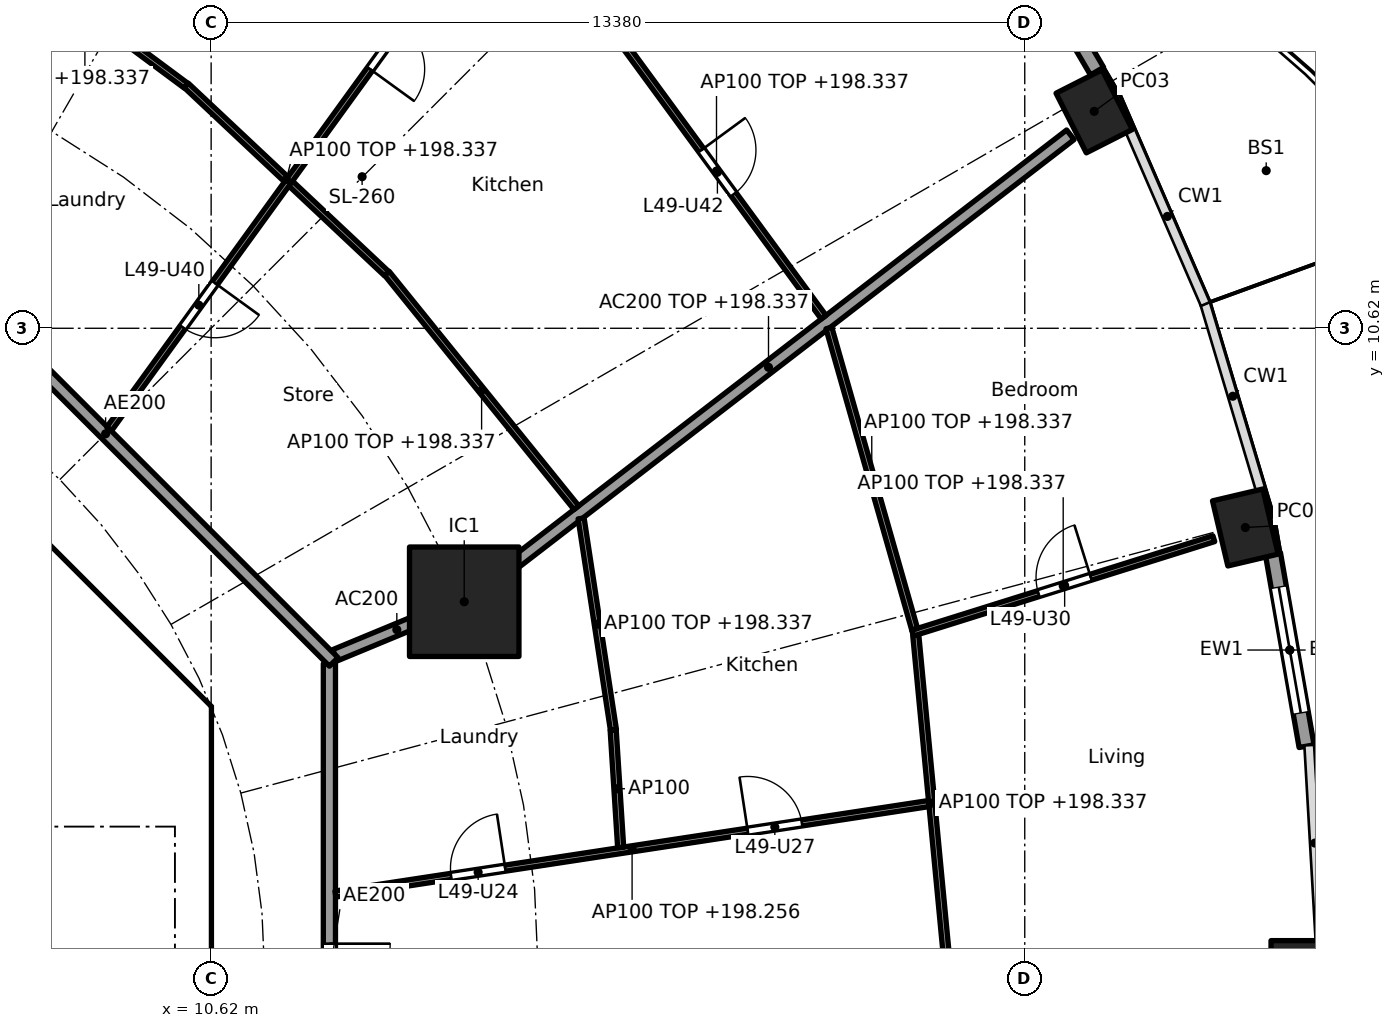
"""IFC4 building model, lengths in metres.
Left out: names, types, materials, properties, quantities, classifications, styles, units other than length and angle.
Written with IfcOpenShell. Run it as: python <this file> out.ifc"""

import sys

from ifc_helpers import new_model, si_unit, direction, frame, frame_2d, origin, origin_2d, place, context, subcontext, project, spatial, polyline, rectangle, hollow_rectangle, outline, extrude, element, fill, save


model = new_model("IFC4")
c1 = context("Model", 3, precision=1e-05, world=origin(), true_north=direction((0.0, 1.0)))
c2 = subcontext(c1, "Body", "Model", "MODEL_VIEW")
j1 = project(units=[si_unit("LENGTHUNIT", "METRE"), si_unit("PLANEANGLEUNIT", "RADIAN")], contexts=[c1])
p1 = place(None, origin())
s1 = spatial("IfcSite", under=j1, at=p1, CompositionType="ELEMENT")
p2 = place(p1, origin())
s2 = spatial("IfcBuilding", under=s1, at=p2, CompositionType="ELEMENT")
p3 = place(p2, frame((0.0, 0.0, 195.5)))
s3 = spatial("IfcBuildingStorey", under=s2, at=p3, CompositionType="ELEMENT", Elevation=195.5)
for number, where, z_axis, x_axis in (
    (1, (28.475, 0.0, 0.0), (0.0, 0.0, 1.0), (0.0, 1.0, 0.0)),
    (2, (27.627, 7.344, 0.0), (0.0, 0.0, 1.0), (-0.229, 0.973, 0.0)),
    (3, (25.142, 14.188, 0.0), (0.0, 0.0, 1.0), (-0.452, 0.892, 0.0)),
):
    element("IfcColumn", number, at=place(p3, frame(where, z_axis=z_axis, x_axis=x_axis)), inside=s3, PredefinedType="COLUMN", context=c2, shape_type="SweptSolid", body=[
        extrude(hollow_rectangle(XDim=1.1, YDim=0.85, WallThickness=0.036, at=origin_2d()), origin(), (0.0, 0.0, 1.0), 3.7),
    ])
p4 = place(p3, frame((14.782, 6.123, 0.0), z_axis=(0.0, 0.0, 1.0), x_axis=(1.0, 0.0, 0.0)))
e4 = element("IfcColumn", 4, at=p4, inside=s3, PredefinedType="COLUMN", context=c2, shape_type="SweptSolid", body=[
    extrude(rectangle(XDim=1.8, YDim=1.8, at=origin_2d()), origin(), (0.0, 0.0, 1.0), 3.7),
])
p5 = place(p3, frame((28.082, 6.91, 0.0), z_axis=(0.0, 0.0, 1.0), x_axis=(0.172149769468, -0.985070787747, 0.0)))
e5 = element("IfcWall", 5, at=p5, inside=s3, PredefinedType="SOLIDWALL", context=c2, shape_type="SweptSolid", body=[
    extrude(rectangle(XDim=3.211, YDim=0.25, at=frame_2d((1.605, 0.0))), origin(), (0.0, 0.0, 1.0), 3.44),
])
p6 = place(p5, frame((0.555, 0.0, 0.0)))
e6 = element("IfcOpeningElement", 6, at=p6, cuts=e5, PredefinedType="OPENING", context=c2, shape_type="SweptSolid", body=[
    extrude(rectangle(XDim=2.1, YDim=2.4, at=frame_2d((1.05, 1.2))), frame((0.0, 0.135, 0.0), z_axis=(0.0, -1.0, 0.0), x_axis=(1.0, 0.0, 0.0)), (0.0, 0.0, 1.0), 0.27),
])
p7 = place(p3, frame((23.624, 17.515, 0.0), z_axis=(0.0, 0.0, 1.0), x_axis=(0.506367803691, -0.862317602386, 0.0)))
e7 = element("IfcWall", 7, at=p7, inside=s3, PredefinedType="SOLIDWALL", context=c2, shape_type="SweptSolid", body=[
    extrude(rectangle(XDim=3.092, YDim=0.25, at=frame_2d((1.546, 0.0))), origin(), (0.0, 0.0, 1.0), 3.44),
])
p8 = place(p7, frame((0.496, 0.0, 0.0)))
e8 = element("IfcOpeningElement", 8, at=p8, cuts=e7, PredefinedType="OPENING", context=c2, shape_type="SweptSolid", body=[
    extrude(rectangle(XDim=2.1, YDim=2.4, at=frame_2d((1.05, 1.2))), frame((0.0, 0.135, 0.0), z_axis=(0.0, -1.0, 0.0), x_axis=(1.0, 0.0, 0.0)), (0.0, 0.0, 1.0), 0.27),
])
p9 = place(p3, frame((9.988, 4.613, 0.0), z_axis=(0.0, 0.0, 1.0), x_axis=(-0.707106781187, 0.707106781187, 0.0)))
e9 = element("IfcWall", 9, at=p9, inside=s3, PredefinedType="SHEAR", context=c2, shape_type="SweptSolid", body=[
    extrude(rectangle(XDim=7.602, YDim=0.6, at=frame_2d((3.801, 0.0))), origin(), (0.0, 0.0, 1.0), 3.44),
])
p10 = place(p9, frame((3.201, 0.0, 0.0)))
e10 = element("IfcOpeningElement", 10, at=p10, cuts=e9, PredefinedType="OPENING", context=c2, shape_type="SweptSolid", body=[
    extrude(rectangle(XDim=1.2, YDim=2.1, at=frame_2d((0.6, 1.05))), frame((0.0, 0.31, 0.0), z_axis=(0.0, -1.0, 0.0), x_axis=(1.0, 0.0, 0.0)), (0.0, 0.0, 1.0), 0.62),
])
p11 = place(p3, frame((6.7, 4.0, 0.0), z_axis=(0.0, 0.0, 1.0), x_axis=(1.0, 0.0, 0.0)))
e11 = element("IfcWall", 11, at=p11, inside=s3, PredefinedType="SOLIDWALL", context=c2, shape_type="SweptSolid", body=[
    extrude(rectangle(XDim=3.325, YDim=0.2, at=frame_2d((1.662, 0.0))), origin(), (0.0, 0.0, 1.0), 3.44),
])
p12 = place(p11, frame((1.25, 0.0, 0.0)))
e12 = element("IfcOpeningElement", 12, at=p12, cuts=e11, PredefinedType="OPENING", context=c2, shape_type="SweptSolid", body=[
    extrude(rectangle(XDim=1.1, YDim=2.1, at=frame_2d((0.55, 1.05))), frame((0.0, 0.11, 0.0), z_axis=(0.0, -1.0, 0.0), x_axis=(1.0, 0.0, 0.0)), (0.0, 0.0, 1.0), 0.22),
])
p13 = place(p3, origin())
e13 = element("IfcWall", 13, at=p13, inside=s3, PredefinedType="SHEAR", context=c2, shape_type="SweptSolid", body=[
    extrude(outline(polyline([(9.776, -4.401), (10.025, -4.152), (10.025, -3.801), (10.025, 4.152), (9.776, 4.401), (10.2, 4.825), (10.625, 4.401), (10.625, -4.401), (10.2, -4.825), (9.776, -4.401)])), origin(), (0.0, 0.0, 1.0), 3.44),
])
p14 = place(p3, frame((12.657, 5.243, 0.0), z_axis=(0.0, 0.0, 1.0), x_axis=(0.92383017907, 0.382802560388, 0.0)))
e14 = element("IfcWall", 14, at=p14, inside=s3, PredefinedType="PARTITIONING", context=c2, shape_type="SweptSolid", body=[
    extrude(rectangle(XDim=2.2, YDim=0.2, at=frame_2d((1.1, 0.0))), origin(), (0.0, 0.0, 1.0), 3.44),
])
p15 = place(p3, frame((14.822, 6.154, 0.0), z_axis=(0.0, 0.0, 1.0), x_axis=(0.792203056092, 0.610257583254, 0.0)))
e15 = element("IfcWall", 15, at=p15, inside=s3, PredefinedType="PARTITIONING", context=c2, shape_type="SweptSolid", body=[
    extrude(rectangle(XDim=12.533, YDim=0.2, at=frame_2d((6.266, 0.0))), origin(), (0.0, 0.0, 1.0), 2.837),
])
p16 = place(p3, frame((12.565, -5.104, 0.0), z_axis=(0.0, 0.0, 1.0), x_axis=(0.0, 1.0, 0.0)))
e16 = element("IfcWall", 16, at=p16, inside=s3, PredefinedType="PARTITIONING", context=c2, shape_type="SweptSolid", body=[
    extrude(rectangle(XDim=10.209, YDim=0.2, at=frame_2d((5.104, 0.0))), origin(), (0.0, 0.0, 1.0), 3.44),
])
p17 = place(p16, frame((4.604, 0.0, 0.0)))
e17 = element("IfcOpeningElement", 17, at=p17, cuts=e16, PredefinedType="OPENING", context=c2, shape_type="SweptSolid", body=[
    extrude(rectangle(XDim=1.0, YDim=2.1, at=frame_2d((0.5, 1.05))), frame((0.0, 0.11, 0.0), z_axis=(0.0, -1.0, 0.0), x_axis=(1.0, 0.0, 0.0)), (0.0, 0.0, 1.0), 0.22),
])
p18 = place(p3, frame((12.635, 5.134, 0.0), z_axis=(0.0, 0.0, 1.0), x_axis=(-0.707106781187, 0.707106781187, 0.0)))
e18 = element("IfcWall", 18, at=p18, inside=s3, PredefinedType="PARTITIONING", context=c2, shape_type="SweptSolid", body=[
    extrude(rectangle(XDim=10.609, YDim=0.2, at=frame_2d((5.305, 0.0))), origin(), (0.0, 0.0, 1.0), 3.44),
])
p19 = place(p3, frame((22.734, 0.05, 0.0), z_axis=(0.0, 0.0, 1.0), x_axis=(-0.094923312677, 0.995484587882, 0.0)))
e19 = element("IfcWall", 19, at=p19, inside=s3, PredefinedType="PARTITIONING", context=c2, shape_type="SweptSolid", body=[
    extrude(rectangle(XDim=5.548, YDim=0.1, at=frame_2d((2.774, 0.0))), origin(), (0.0, 0.0, 1.0), 2.837),
])
p20 = place(p3, frame((12.664, 1.316, 0.0), z_axis=(0.0, 0.0, 1.0), x_axis=(0.988579217853, 0.150702123505, 0.0)))
e20 = element("IfcWall", 20, at=p20, inside=s3, PredefinedType="PARTITIONING", context=c2, shape_type="SweptSolid", body=[
    extrude(rectangle(XDim=9.871, YDim=0.1, at=frame_2d((4.936, 0.0))), origin(), (0.0, 0.0, 1.0), 2.756),
])
p21 = place(p20, frame((1.924, 0.0, 0.0)))
e21 = element("IfcOpeningElement", 21, at=p21, cuts=e20, PredefinedType="OPENING", context=c2, shape_type="SweptSolid", body=[
    extrude(rectangle(XDim=0.9, YDim=2.1, at=frame_2d((0.45, 1.05))), frame((0.0, 0.06, 0.0), z_axis=(0.0, -1.0, 0.0), x_axis=(1.0, 0.0, 0.0)), (0.0, 0.0, 1.0), 0.12),
])
p22 = place(p20, frame((6.86, 0.0, 0.0)))
e22 = element("IfcOpeningElement", 22, at=p22, cuts=e20, PredefinedType="OPENING", context=c2, shape_type="SweptSolid", body=[
    extrude(rectangle(XDim=0.9, YDim=2.1, at=frame_2d((0.45, 1.05))), frame((0.0, 0.06, 0.0), z_axis=(0.0, -1.0, 0.0), x_axis=(1.0, 0.0, 0.0)), (0.0, 0.0, 1.0), 0.12),
])
p23 = place(p3, frame((17.355, 2.082, 0.0), z_axis=(0.0, 0.0, 1.0), x_axis=(-0.063689464349, 0.997969765139, 0.0)))
e23 = element("IfcWall", 23, at=p23, inside=s3, PredefinedType="PARTITIONING", context=c2, shape_type="SweptSolid", body=[
    extrude(rectangle(XDim=1.936, YDim=0.1, at=frame_2d((0.968, 0.0))), origin(), (0.0, 0.0, 1.0), 3.44),
])
p24 = place(p3, frame((17.236, 4.014, 0.0), z_axis=(0.0, 0.0, 1.0), x_axis=(-0.151087537093, 0.988520387314, 0.0)))
e24 = element("IfcWall", 24, at=p24, inside=s3, PredefinedType="PARTITIONING", context=c2, shape_type="SweptSolid", body=[
    extrude(rectangle(XDim=3.519, YDim=0.1, at=frame_2d((1.76, 0.0))), origin(), (0.0, 0.0, 1.0), 2.837),
])
p25 = place(p3, frame((22.155, 5.607, 0.0), z_axis=(0.0, 0.0, 1.0), x_axis=(0.954251251005, 0.299005936321, 0.0)))
e25 = element("IfcWall", 25, at=p25, inside=s3, PredefinedType="PARTITIONING", context=c2, shape_type="SweptSolid", body=[
    extrude(rectangle(XDim=5.191, YDim=0.1, at=frame_2d((2.596, 0.0))), origin(), (0.0, 0.0, 1.0), 2.837),
])
p26 = place(p25, frame((2.171, 0.0, 0.0)))
e26 = element("IfcOpeningElement", 26, at=p26, cuts=e25, PredefinedType="OPENING", context=c2, shape_type="SweptSolid", body=[
    extrude(rectangle(XDim=0.9, YDim=2.1, at=frame_2d((0.45, 1.05))), frame((0.0, 0.06, 0.0), z_axis=(0.0, -1.0, 0.0), x_axis=(1.0, 0.0, 0.0)), (0.0, 0.0, 1.0), 0.12),
])
p27 = place(p3, frame((22.189, 5.67, 0.0), z_axis=(0.0, 0.0, 1.0), x_axis=(-0.273819702124, 0.961781040949, 0.0)))
e27 = element("IfcWall", 27, at=p27, inside=s3, PredefinedType="PARTITIONING", context=c2, shape_type="SweptSolid", body=[
    extrude(rectangle(XDim=5.152, YDim=0.1, at=frame_2d((2.576, 0.0))), origin(), (0.0, 0.0, 1.0), 2.837),
])
p28 = place(p3, frame((16.626, 7.67, 0.0), z_axis=(0.0, 0.0, 1.0), x_axis=(-0.628764602857, 0.777595700987, 0.0)))
e28 = element("IfcWall", 28, at=p28, inside=s3, PredefinedType="PARTITIONING", context=c2, shape_type="SweptSolid", body=[
    extrude(rectangle(XDim=4.957, YDim=0.1, at=frame_2d((2.479, 0.0))), origin(), (0.0, 0.0, 1.0), 2.837),
])
p29 = place(p3, frame((20.692, 10.802, 0.0), z_axis=(0.0, 0.0, 1.0), x_axis=(-0.591122127251, 0.806582066918, 0.0)))
e29 = element("IfcWall", 29, at=p29, inside=s3, PredefinedType="PARTITIONING", context=c2, shape_type="SweptSolid", body=[
    extrude(rectangle(XDim=5.96, YDim=0.1, at=frame_2d((2.98, 0.0))), origin(), (0.0, 0.0, 1.0), 2.837),
])
p30 = place(p29, frame((2.505, 0.0, 0.0)))
e30 = element("IfcOpeningElement", 30, at=p30, cuts=e29, PredefinedType="OPENING", context=c2, shape_type="SweptSolid", body=[
    extrude(rectangle(XDim=0.9, YDim=2.1, at=frame_2d((0.45, 1.05))), frame((0.0, 0.06, 0.0), z_axis=(0.0, -1.0, 0.0), x_axis=(1.0, 0.0, 0.0)), (0.0, 0.0, 1.0), 0.12),
])
p31 = place(p3, frame((13.504, 11.52, 0.0), z_axis=(0.0, 0.0, 1.0), x_axis=(-0.728883199496, 0.684638066055, 0.0)))
e31 = element("IfcWall", 31, at=p31, inside=s3, PredefinedType="PARTITIONING", context=c2, shape_type="SweptSolid", body=[
    extrude(rectangle(XDim=4.519, YDim=0.1, at=frame_2d((2.26, 0.0))), origin(), (0.0, 0.0, 1.0), 2.837),
])
p32 = place(p3, frame((8.943, 8.966, 0.0), z_axis=(0.0, 0.0, 1.0), x_axis=(0.586803608919, 0.809729290912, 0.0)))
e32 = element("IfcWall", 32, at=p32, inside=s3, PredefinedType="PARTITIONING", context=c2, shape_type="SweptSolid", body=[
    extrude(rectangle(XDim=17.179, YDim=0.1, at=frame_2d((8.589, 0.0))), origin(), (0.0, 0.0, 1.0), 2.756),
])
p33 = place(p32, frame((2.062, 0.0, 0.0)))
e33 = element("IfcOpeningElement", 33, at=p33, cuts=e32, PredefinedType="OPENING", context=c2, shape_type="SweptSolid", body=[
    extrude(rectangle(XDim=0.9, YDim=2.1, at=frame_2d((0.45, 1.05))), frame((0.0, 0.06, 0.0), z_axis=(0.0, -1.0, 0.0), x_axis=(1.0, 0.0, 0.0)), (0.0, 0.0, 1.0), 0.12),
])
p34 = place(p32, frame((7.308, 0.0, 0.0)))
e34 = element("IfcOpeningElement", 34, at=p34, cuts=e32, PredefinedType="OPENING", context=c2, shape_type="SweptSolid", body=[
    extrude(rectangle(XDim=0.9, YDim=2.1, at=frame_2d((0.45, 1.05))), frame((0.0, 0.06, 0.0), z_axis=(0.0, -1.0, 0.0), x_axis=(1.0, 0.0, 0.0)), (0.0, 0.0, 1.0), 0.12),
])
p35 = place(p3, frame((10.207, 14.61, 0.0), z_axis=(0.0, 0.0, 1.0), x_axis=(-0.802784956441, 0.596268659005, 0.0)))
e35 = element("IfcWall", 35, at=p35, inside=s3, PredefinedType="PARTITIONING", context=c2, shape_type="SweptSolid", body=[
    extrude(rectangle(XDim=4.142, YDim=0.1, at=frame_2d((2.071, 0.0))), origin(), (0.0, 0.0, 1.0), 2.837),
])
p36 = place(p3, frame((6.138, 14.83, 0.0), z_axis=(0.0, 0.0, 1.0), x_axis=(0.294818517221, 0.955553264818, 0.0)))
e36 = element("IfcWall", 36, at=p36, inside=s3, PredefinedType="PARTITIONING", context=c2, shape_type="SweptSolid", body=[
    extrude(rectangle(XDim=12.619, YDim=0.1, at=frame_2d((6.31, 0.0))), origin(), (0.0, 0.0, 1.0), 2.837),
])
p37 = place(p36, frame((1.306, 0.0, 0.0)))
e37 = element("IfcOpeningElement", 37, at=p37, cuts=e36, PredefinedType="OPENING", context=c2, shape_type="SweptSolid", body=[
    extrude(rectangle(XDim=0.9, YDim=2.1, at=frame_2d((0.45, 1.05))), frame((0.0, 0.06, 0.0), z_axis=(0.0, -1.0, 0.0), x_axis=(1.0, 0.0, 0.0)), (0.0, 0.0, 1.0), 0.12),
])
p38 = place(p36, frame((4.515, 0.0, 0.0)))
e38 = element("IfcOpeningElement", 38, at=p38, cuts=e36, PredefinedType="OPENING", context=c2, shape_type="SweptSolid", body=[
    extrude(rectangle(XDim=0.9, YDim=2.1, at=frame_2d((0.45, 1.05))), frame((0.0, 0.06, 0.0), z_axis=(0.0, -1.0, 0.0), x_axis=(1.0, 0.0, 0.0)), (0.0, 0.0, 1.0), 0.12),
])
p39 = place(p6, origin())
e39 = element("IfcDoor", 39, at=p39, inside=s3, OperationType="SLIDING_TO_LEFT", PredefinedType="DOOR", context=c2, shape_type="SweptSolid", body=[
    extrude(rectangle(XDim=2.1, YDim=2.4, at=frame_2d((1.05, 1.2))), frame((0.0, 0.025, 0.0), z_axis=(0.0, -1.0, 0.0), x_axis=(1.0, 0.0, 0.0)), (0.0, 0.0, 1.0), 0.05),
])
fill(e6, e39)
p40 = place(p12, frame((1.1, 0.0, 0.0), x_axis=(-1.0, 0.0, 0.0)))
e40 = element("IfcDoor", 40, at=p40, inside=s3, OperationType="SINGLE_SWING_LEFT", PredefinedType="DOOR", context=c2, shape_type="SweptSolid", body=[
    extrude(rectangle(XDim=1.1, YDim=2.1, at=frame_2d((0.55, 1.05))), frame((0.0, 0.025, 0.0), z_axis=(0.0, -1.0, 0.0), x_axis=(1.0, 0.0, 0.0)), (0.0, 0.0, 1.0), 0.05),
])
fill(e12, e40)
p41 = place(p17, frame((1.0, 0.0, 0.0), x_axis=(-1.0, 0.0, 0.0)))
e41 = element("IfcDoor", 41, at=p41, inside=s3, OperationType="SINGLE_SWING_LEFT", PredefinedType="DOOR", context=c2, shape_type="SweptSolid", body=[
    extrude(rectangle(XDim=1.0, YDim=2.1, at=frame_2d((0.5, 1.05))), frame((0.0, 0.025, 0.0), z_axis=(0.0, -1.0, 0.0), x_axis=(1.0, 0.0, 0.0)), (0.0, 0.0, 1.0), 0.05),
])
fill(e17, e41)
p42 = place(p21, origin())
e42 = element("IfcDoor", 42, at=p42, inside=s3, OperationType="SINGLE_SWING_RIGHT", PredefinedType="DOOR", context=c2, shape_type="SweptSolid", body=[
    extrude(rectangle(XDim=0.9, YDim=2.1, at=frame_2d((0.45, 1.05))), frame((0.0, 0.025, 0.0), z_axis=(0.0, -1.0, 0.0), x_axis=(1.0, 0.0, 0.0)), (0.0, 0.0, 1.0), 0.05),
])
fill(e21, e42)
p43 = place(p22, origin())
e43 = element("IfcDoor", 43, at=p43, inside=s3, OperationType="SINGLE_SWING_LEFT", PredefinedType="DOOR", context=c2, shape_type="SweptSolid", body=[
    extrude(rectangle(XDim=0.9, YDim=2.1, at=frame_2d((0.45, 1.05))), frame((0.0, 0.025, 0.0), z_axis=(0.0, -1.0, 0.0), x_axis=(1.0, 0.0, 0.0)), (0.0, 0.0, 1.0), 0.05),
])
fill(e22, e43)
p44 = place(p26, origin())
e44 = element("IfcDoor", 44, at=p44, inside=s3, OperationType="SINGLE_SWING_RIGHT", PredefinedType="DOOR", context=c2, shape_type="SweptSolid", body=[
    extrude(rectangle(XDim=0.9, YDim=2.1, at=frame_2d((0.45, 1.05))), frame((0.0, 0.025, 0.0), z_axis=(0.0, -1.0, 0.0), x_axis=(1.0, 0.0, 0.0)), (0.0, 0.0, 1.0), 0.05),
])
fill(e26, e44)
p45 = place(p33, frame((0.9, 0.0, 0.0), x_axis=(-1.0, 0.0, 0.0)))
e45 = element("IfcDoor", 45, at=p45, inside=s3, OperationType="SINGLE_SWING_LEFT", PredefinedType="DOOR", context=c2, shape_type="SweptSolid", body=[
    extrude(rectangle(XDim=0.9, YDim=2.1, at=frame_2d((0.45, 1.05))), frame((0.0, 0.025, 0.0), z_axis=(0.0, -1.0, 0.0), x_axis=(1.0, 0.0, 0.0)), (0.0, 0.0, 1.0), 0.05),
])
fill(e33, e45)
p46 = place(p34, frame((0.9, 0.0, 0.0), x_axis=(-1.0, 0.0, 0.0)))
e46 = element("IfcDoor", 46, at=p46, inside=s3, OperationType="SINGLE_SWING_RIGHT", PredefinedType="DOOR", context=c2, shape_type="SweptSolid", body=[
    extrude(rectangle(XDim=0.9, YDim=2.1, at=frame_2d((0.45, 1.05))), frame((0.0, 0.025, 0.0), z_axis=(0.0, -1.0, 0.0), x_axis=(1.0, 0.0, 0.0)), (0.0, 0.0, 1.0), 0.05),
])
fill(e34, e46)
p47 = place(p30, frame((0.9, 0.0, 0.0), x_axis=(-1.0, 0.0, 0.0)))
e47 = element("IfcDoor", 47, at=p47, inside=s3, OperationType="SINGLE_SWING_LEFT", PredefinedType="DOOR", context=c2, shape_type="SweptSolid", body=[
    extrude(rectangle(XDim=0.9, YDim=2.1, at=frame_2d((0.45, 1.05))), frame((0.0, 0.025, 0.0), z_axis=(0.0, -1.0, 0.0), x_axis=(1.0, 0.0, 0.0)), (0.0, 0.0, 1.0), 0.05),
])
fill(e30, e47)
save(model, sys.argv[1])
